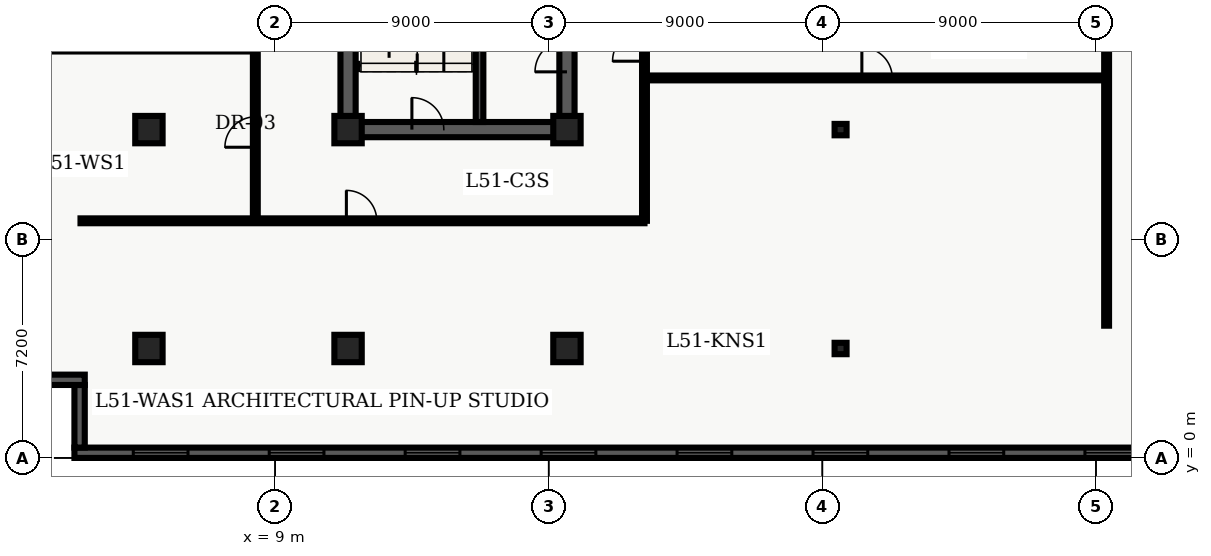
"""IFC4 building model, lengths in metres.
Left out: names, types, materials, properties, quantities, classifications, styles, units other than length and angle.
Written with IfcOpenShell. Run it as: python <this file> out.ifc"""

import sys

from ifc_helpers import new_model, entity, si_unit, converted_unit, direction, frame, origin_with_axes, origin_2d_with_axis, place, context, subcontext, project, spatial, polyline, rectangle, i_section, outline, extrude, element, fill, save


model = new_model("IFC4")
c1 = context("Model", 3, precision=1e-05, world=origin_with_axes(), true_north=direction((0.0, 1.0)))
c2 = subcontext(c1, "Body", "Model", "MODEL_VIEW")
j1 = project(units=[si_unit("LENGTHUNIT", "METRE"), converted_unit("PLANEANGLEUNIT", "DEGREE", entity("IfcPlaneAngleMeasure", 0.017), si_unit("PLANEANGLEUNIT", "RADIAN"), dimensions=[0, 0, 0, 0, 0, 0, 0])], contexts=[c1])
p1 = place(None, origin_with_axes())
s1 = spatial("IfcSite", under=j1, at=p1, CompositionType="ELEMENT")
p2 = place(p1, origin_with_axes())
s2 = spatial("IfcBuilding", under=s1, at=p2, CompositionType="ELEMENT")
p3 = place(p2, frame((0.0, 0.0, 208.2), z_axis=(0.0, 0.0, 1.0), x_axis=(1.0, 0.0, 0.0)))
s3 = spatial("IfcBuildingStorey", under=s2, at=p3, CompositionType="ELEMENT", Elevation=208.2)
p4 = place(p3, frame((11.4, 10.8, 0.0), z_axis=(0.0, 0.0, 1.0), x_axis=(0.0, 1.0, 0.0)))
e1 = element("IfcWall", 1, at=p4, inside=s3, PredefinedType="SHEAR", context=c2, shape_type="SweptSolid", body=[
    extrude(outline(polyline([(0.0, -0.25), (27.0, -0.25), (27.0, 0.25), (0.0, 0.25), (0.0, -0.25)])), origin_with_axes(), (0.0, 0.0, 1.0), 3.66),
])
p5 = place(p3, frame((11.4, 10.8, 0.0), z_axis=(0.0, 0.0, 1.0), x_axis=(1.0, 0.0, 0.0)))
e2 = element("IfcWall", 2, at=p5, inside=s3, PredefinedType="SHEAR", context=c2, shape_type="SweptSolid", body=[
    extrude(outline(polyline([(0.0, -0.25), (7.2, -0.25), (7.2, 0.25), (0.0, 0.25), (0.0, -0.25)])), origin_with_axes(), (0.0, 0.0, 1.0), 3.66),
])
p6 = place(p5, frame((2.625, 0.0, 0.0), z_axis=(0.0, 0.0, 1.0), x_axis=(1.0, 0.0, 0.0)))
e3 = element("IfcOpeningElement", 3, at=p6, cuts=e2, PredefinedType="OPENING", context=c2, shape_type="SweptSolid", body=[
    extrude(rectangle(XDim=1.05, YDim=0.52, at=origin_2d_with_axis()), origin_with_axes(), (0.0, 0.0, 1.0), 2.15),
])
p7 = place(p3, frame((18.6, 10.8, 0.0), z_axis=(0.0, 0.0, 1.0), x_axis=(0.0, 1.0, 0.0)))
e4 = element("IfcWall", 4, at=p7, inside=s3, PredefinedType="SHEAR", context=c2, shape_type="SweptSolid", body=[
    extrude(outline(polyline([(0.0, -0.25), (13.5, -0.25), (13.5, 0.25), (0.0, 0.25), (0.0, -0.25)])), origin_with_axes(), (0.0, 0.0, 1.0), 3.66),
])
p8 = place(p7, frame((11.125, 0.0, 0.0), z_axis=(0.0, 0.0, 1.0), x_axis=(1.0, 0.0, 0.0)))
e5 = element("IfcOpeningElement", 5, at=p8, cuts=e4, PredefinedType="OPENING", context=c2, shape_type="SweptSolid", body=[
    extrude(rectangle(XDim=1.05, YDim=0.52, at=origin_2d_with_axis()), origin_with_axes(), (0.0, 0.0, 1.0), 2.15),
])
p9 = place(p7, frame((2.425, 0.0, 0.0), z_axis=(0.0, 0.0, 1.0), x_axis=(1.0, 0.0, 0.0)))
e6 = element("IfcOpeningElement", 6, at=p9, cuts=e4, PredefinedType="OPENING", context=c2, shape_type="SweptSolid", body=[
    extrude(rectangle(XDim=1.05, YDim=0.52, at=origin_2d_with_axis()), origin_with_axes(), (0.0, 0.0, 1.0), 2.15),
])
p10 = place(p7, frame((6.725, 0.0, 0.0), z_axis=(0.0, 0.0, 1.0), x_axis=(1.0, 0.0, 0.0)))
e7 = element("IfcOpeningElement", 7, at=p10, cuts=e4, PredefinedType="OPENING", context=c2, shape_type="SweptSolid", body=[
    extrude(rectangle(XDim=1.05, YDim=0.52, at=origin_2d_with_axis()), origin_with_axes(), (0.0, 0.0, 1.0), 2.15),
])
p11 = place(p3, frame((15.725, 11.05, 0.0), z_axis=(0.0, 0.0, 1.0), x_axis=(0.0, 1.0, 0.0)))
e8 = element("IfcWall", 8, at=p11, inside=s3, PredefinedType="SHEAR", context=c2, shape_type="SweptSolid", body=[
    extrude(outline(polyline([(0.0, -0.125), (8.65, -0.125), (8.65, 0.125), (0.0, 0.125), (0.0, -0.125)])), origin_with_axes(), (0.0, 0.0, 1.0), 3.66),
])
for number, where, z_axis, x_axis in (
    (9, (11.4, 3.6, 0.0), (0.0, 0.0, 1.0), (1.0, 0.0, 0.0)),
    (10, (11.4, 10.8, 0.0), (0.0, 0.0, 1.0), (1.0, 0.0, 0.0)),
    (11, (18.6, 3.6, 0.0), (0.0, 0.0, 1.0), (1.0, 0.0, 0.0)),
    (12, (18.6, 10.8, 0.0), (0.0, 0.0, 1.0), (1.0, 0.0, 0.0)),
    (13, (4.85, 3.6, 0.0), (0.0, 0.0, 1.0), (1.0, 0.0, 0.0)),
    (14, (4.85, 10.8, 0.0), (0.0, 0.0, 1.0), (1.0, 0.0, 0.0)),
):
    element("IfcColumn", number, at=place(p3, frame(where, z_axis=z_axis, x_axis=x_axis)), inside=s3, PredefinedType="COLUMN", context=c2, shape_type="SweptSolid", body=[
        extrude(rectangle(XDim=0.9, YDim=0.9, at=origin_2d_with_axis()), origin_with_axes(), (0.0, 0.0, 1.0), 3.9),
    ])
for number, where, z_axis, x_axis in (
    (15, (27.6, 3.6, 0.0), (0.0, 0.0, 1.0), (1.0, 0.0, 0.0)),
    (16, (27.6, 10.8, 0.0), (0.0, 0.0, 1.0), (1.0, 0.0, 0.0)),
):
    element("IfcColumn", number, at=place(p3, frame(where, z_axis=z_axis, x_axis=x_axis)), inside=s3, PredefinedType="COLUMN", context=c2, shape_type="SweptSolid", body=[
        extrude(i_section(OverallWidth=0.394, OverallDepth=0.375, WebThickness=0.017, FlangeThickness=0.028, FilletRadius=0.02, at=origin_2d_with_axis()), origin_with_axes(), (0.0, 0.0, 1.0), 3.9),
    ])
p12 = place(p3, frame((2.6, 7.8, 0.0), z_axis=(0.0, 0.0, 1.0), x_axis=(1.0, 0.0, 0.0)))
e17 = element("IfcWall", 17, at=p12, inside=s3, PredefinedType="PARTITIONING", context=c2, shape_type="SweptSolid", body=[
    extrude(outline(polyline([(0.0, -0.08), (18.55, -0.08), (18.55, 0.08), (0.0, 0.08), (0.0, -0.08)])), origin_with_axes(), (0.0, 0.0, 1.0), 2.7),
])
p13 = place(p12, frame((9.245, 0.0, 0.0), z_axis=(0.0, 0.0, 1.0), x_axis=(1.0, 0.0, 0.0)))
e18 = element("IfcOpeningElement", 18, at=p13, cuts=e17, PredefinedType="OPENING", context=c2, shape_type="SweptSolid", body=[
    extrude(rectangle(XDim=1.0, YDim=0.18, at=origin_2d_with_axis()), origin_with_axes(), (0.0, 0.0, 1.0), 2.15),
])
p14 = place(p3, frame((21.15, 7.8, 0.0), z_axis=(0.0, 0.0, 1.0), x_axis=(0.0, 1.0, 0.0)))
e19 = element("IfcWall", 19, at=p14, inside=s3, PredefinedType="PARTITIONING", context=c2, shape_type="SweptSolid", body=[
    extrude(outline(polyline([(0.0, -0.08), (32.7, -0.08), (32.7, 0.08), (0.0, 0.08), (0.0, -0.08)])), origin_with_axes(), (0.0, 0.0, 1.0), 2.7),
])
p15 = place(p14, frame((15.566, 0.0, 0.0), z_axis=(0.0, 0.0, 1.0), x_axis=(1.0, 0.0, 0.0)))
e20 = element("IfcOpeningElement", 20, at=p15, cuts=e19, PredefinedType="OPENING", context=c2, shape_type="SweptSolid", body=[
    extrude(rectangle(XDim=1.0, YDim=0.18, at=origin_2d_with_axis()), origin_with_axes(), (0.0, 0.0, 1.0), 2.15),
])
p16 = place(p14, frame((19.003, 0.0, 0.0), z_axis=(0.0, 0.0, 1.0), x_axis=(1.0, 0.0, 0.0)))
e21 = element("IfcOpeningElement", 21, at=p16, cuts=e19, PredefinedType="OPENING", context=c2, shape_type="SweptSolid", body=[
    extrude(rectangle(XDim=1.0, YDim=0.18, at=origin_2d_with_axis()), origin_with_axes(), (0.0, 0.0, 1.0), 2.15),
])
p17 = place(p14, frame((22.854, 0.0, 0.0), z_axis=(0.0, 0.0, 1.0), x_axis=(1.0, 0.0, 0.0)))
e22 = element("IfcOpeningElement", 22, at=p17, cuts=e19, PredefinedType="OPENING", context=c2, shape_type="SweptSolid", body=[
    extrude(rectangle(XDim=1.0, YDim=0.18, at=origin_2d_with_axis()), origin_with_axes(), (0.0, 0.0, 1.0), 2.15),
])
p18 = place(p14, frame((27.208, 0.0, 0.0), z_axis=(0.0, 0.0, 1.0), x_axis=(1.0, 0.0, 0.0)))
e23 = element("IfcOpeningElement", 23, at=p18, cuts=e19, PredefinedType="OPENING", context=c2, shape_type="SweptSolid", body=[
    extrude(rectangle(XDim=1.0, YDim=0.18, at=origin_2d_with_axis()), origin_with_axes(), (0.0, 0.0, 1.0), 2.15),
])
p19 = place(p14, frame((31.041, 0.0, 0.0), z_axis=(0.0, 0.0, 1.0), x_axis=(1.0, 0.0, 0.0)))
e24 = element("IfcOpeningElement", 24, at=p19, cuts=e19, PredefinedType="OPENING", context=c2, shape_type="SweptSolid", body=[
    extrude(rectangle(XDim=1.0, YDim=0.18, at=origin_2d_with_axis()), origin_with_axes(), (0.0, 0.0, 1.0), 2.15),
])
p20 = place(p14, frame((5.775, 0.0, 0.0), z_axis=(0.0, 0.0, 1.0), x_axis=(1.0, 0.0, 0.0)))
e25 = element("IfcOpeningElement", 25, at=p20, cuts=e19, PredefinedType="OPENING", context=c2, shape_type="SweptSolid", body=[
    extrude(rectangle(XDim=1.05, YDim=0.18, at=origin_2d_with_axis()), origin_with_axes(), (0.0, 0.0, 1.0), 2.15),
])
p21 = place(p3, frame((8.35, 7.8, 0.0), z_axis=(0.0, 0.0, 1.0), x_axis=(0.0, 1.0, 0.0)))
e26 = element("IfcWall", 26, at=p21, inside=s3, PredefinedType="PARTITIONING", context=c2, shape_type="SweptSolid", body=[
    extrude(outline(polyline([(0.0, -0.08), (12.6, -0.08), (12.6, 0.08), (0.0, 0.08), (0.0, -0.08)])), origin_with_axes(), (0.0, 0.0, 1.0), 2.7),
])
p22 = place(p21, frame((2.92, 0.0, 0.0), z_axis=(0.0, 0.0, 1.0), x_axis=(1.0, 0.0, 0.0)))
e27 = element("IfcOpeningElement", 27, at=p22, cuts=e26, PredefinedType="OPENING", context=c2, shape_type="SweptSolid", body=[
    extrude(rectangle(XDim=1.0, YDim=0.18, at=origin_2d_with_axis()), origin_with_axes(), (0.0, 0.0, 1.0), 2.15),
])
p23 = place(p21, frame((9.115, 0.0, 0.0), z_axis=(0.0, 0.0, 1.0), x_axis=(1.0, 0.0, 0.0)))
e28 = element("IfcOpeningElement", 28, at=p23, cuts=e26, PredefinedType="OPENING", context=c2, shape_type="SweptSolid", body=[
    extrude(rectangle(XDim=1.0, YDim=0.18, at=origin_2d_with_axis()), origin_with_axes(), (0.0, 0.0, 1.0), 2.15),
])
p24 = place(p3, frame((21.15, 12.5, 0.0), z_axis=(0.0, 0.0, 1.0), x_axis=(1.0, 0.0, 0.0)))
e29 = element("IfcWall", 29, at=p24, inside=s3, PredefinedType="PARTITIONING", context=c2, shape_type="SweptSolid", body=[
    extrude(outline(polyline([(0.0, -0.08), (15.2, -0.08), (15.2, 0.08), (0.0, 0.08), (0.0, -0.08)])), origin_with_axes(), (0.0, 0.0, 1.0), 2.7),
])
p25 = place(p24, frame((7.65, 0.0, 0.0), z_axis=(0.0, 0.0, 1.0), x_axis=(1.0, 0.0, 0.0)))
e30 = element("IfcOpeningElement", 30, at=p25, cuts=e29, PredefinedType="OPENING", context=c2, shape_type="SweptSolid", body=[
    extrude(rectangle(XDim=1.0, YDim=0.18, at=origin_2d_with_axis()), origin_with_axes(), (0.0, 0.0, 1.0), 2.15),
])
p26 = place(p3, frame((36.35, 4.35, 0.0), z_axis=(0.0, 0.0, 1.0), x_axis=(0.0, 1.0, 0.0)))
e31 = element("IfcWall", 31, at=p26, inside=s3, PredefinedType="PARTITIONING", context=c2, shape_type="SweptSolid", body=[
    extrude(outline(polyline([(0.0, -0.08), (16.95, -0.08), (16.95, 0.08), (0.0, 0.08), (0.0, -0.08)])), origin_with_axes(), (0.0, 0.0, 1.0), 2.7),
])
p27 = place(p3, frame((57.26, 0.17, 0.0), z_axis=(0.0, 0.0, 1.0), x_axis=(-1.0, 0.0, 0.0)))
e32 = element("IfcWall", 32, at=p27, inside=s3, PredefinedType="SOLIDWALL", context=c2, shape_type="SweptSolid", body=[
    extrude(outline(polyline([(0.0, -0.17), (54.86, -0.17), (54.86, 0.17), (0.0, 0.17), (0.0, -0.17)])), origin_with_axes(), (0.0, 0.0, 1.0), 3.66),
])
p28 = place(p27, frame((2.836, 0.0, 0.45), z_axis=(0.0, 0.0, 1.0), x_axis=(1.0, 0.0, 0.0)))
e33 = element("IfcOpeningElement", 33, at=p28, cuts=e32, PredefinedType="OPENING", context=c2, shape_type="SweptSolid", body=[
    extrude(rectangle(XDim=1.8, YDim=0.36, at=origin_2d_with_axis()), origin_with_axes(), (0.0, 0.0, 1.0), 2.1),
])
p29 = place(p27, frame((7.307, 0.0, 0.45), z_axis=(0.0, 0.0, 1.0), x_axis=(1.0, 0.0, 0.0)))
e34 = element("IfcOpeningElement", 34, at=p29, cuts=e32, PredefinedType="OPENING", context=c2, shape_type="SweptSolid", body=[
    extrude(rectangle(XDim=1.8, YDim=0.36, at=origin_2d_with_axis()), origin_with_axes(), (0.0, 0.0, 1.0), 2.1),
])
p30 = place(p27, frame((11.779, 0.0, 0.45), z_axis=(0.0, 0.0, 1.0), x_axis=(1.0, 0.0, 0.0)))
e35 = element("IfcOpeningElement", 35, at=p30, cuts=e32, PredefinedType="OPENING", context=c2, shape_type="SweptSolid", body=[
    extrude(rectangle(XDim=1.8, YDim=0.36, at=origin_2d_with_axis()), origin_with_axes(), (0.0, 0.0, 1.0), 2.1),
])
p31 = place(p27, frame((16.251, 0.0, 0.45), z_axis=(0.0, 0.0, 1.0), x_axis=(1.0, 0.0, 0.0)))
e36 = element("IfcOpeningElement", 36, at=p31, cuts=e32, PredefinedType="OPENING", context=c2, shape_type="SweptSolid", body=[
    extrude(rectangle(XDim=1.8, YDim=0.36, at=origin_2d_with_axis()), origin_with_axes(), (0.0, 0.0, 1.0), 2.1),
])
p32 = place(p27, frame((20.723, 0.0, 0.45), z_axis=(0.0, 0.0, 1.0), x_axis=(1.0, 0.0, 0.0)))
e37 = element("IfcOpeningElement", 37, at=p32, cuts=e32, PredefinedType="OPENING", context=c2, shape_type="SweptSolid", body=[
    extrude(rectangle(XDim=1.8, YDim=0.36, at=origin_2d_with_axis()), origin_with_axes(), (0.0, 0.0, 1.0), 2.1),
])
p33 = place(p27, frame((25.194, 0.0, 0.45), z_axis=(0.0, 0.0, 1.0), x_axis=(1.0, 0.0, 0.0)))
e38 = element("IfcOpeningElement", 38, at=p33, cuts=e32, PredefinedType="OPENING", context=c2, shape_type="SweptSolid", body=[
    extrude(rectangle(XDim=1.8, YDim=0.36, at=origin_2d_with_axis()), origin_with_axes(), (0.0, 0.0, 1.0), 2.1),
])
p34 = place(p27, frame((29.666, 0.0, 0.45), z_axis=(0.0, 0.0, 1.0), x_axis=(1.0, 0.0, 0.0)))
e39 = element("IfcOpeningElement", 39, at=p34, cuts=e32, PredefinedType="OPENING", context=c2, shape_type="SweptSolid", body=[
    extrude(rectangle(XDim=1.8, YDim=0.36, at=origin_2d_with_axis()), origin_with_axes(), (0.0, 0.0, 1.0), 2.1),
])
p35 = place(p27, frame((34.138, 0.0, 0.45), z_axis=(0.0, 0.0, 1.0), x_axis=(1.0, 0.0, 0.0)))
e40 = element("IfcOpeningElement", 40, at=p35, cuts=e32, PredefinedType="OPENING", context=c2, shape_type="SweptSolid", body=[
    extrude(rectangle(XDim=1.8, YDim=0.36, at=origin_2d_with_axis()), origin_with_axes(), (0.0, 0.0, 1.0), 2.1),
])
p36 = place(p27, frame((38.609, 0.0, 0.45), z_axis=(0.0, 0.0, 1.0), x_axis=(1.0, 0.0, 0.0)))
e41 = element("IfcOpeningElement", 41, at=p36, cuts=e32, PredefinedType="OPENING", context=c2, shape_type="SweptSolid", body=[
    extrude(rectangle(XDim=1.8, YDim=0.36, at=origin_2d_with_axis()), origin_with_axes(), (0.0, 0.0, 1.0), 2.1),
])
p37 = place(p27, frame((43.081, 0.0, 0.45), z_axis=(0.0, 0.0, 1.0), x_axis=(1.0, 0.0, 0.0)))
e42 = element("IfcOpeningElement", 42, at=p37, cuts=e32, PredefinedType="OPENING", context=c2, shape_type="SweptSolid", body=[
    extrude(rectangle(XDim=1.8, YDim=0.36, at=origin_2d_with_axis()), origin_with_axes(), (0.0, 0.0, 1.0), 2.1),
])
p38 = place(p27, frame((47.553, 0.0, 0.45), z_axis=(0.0, 0.0, 1.0), x_axis=(1.0, 0.0, 0.0)))
e43 = element("IfcOpeningElement", 43, at=p38, cuts=e32, PredefinedType="OPENING", context=c2, shape_type="SweptSolid", body=[
    extrude(rectangle(XDim=1.8, YDim=0.36, at=origin_2d_with_axis()), origin_with_axes(), (0.0, 0.0, 1.0), 2.1),
])
p39 = place(p27, frame((52.024, 0.0, 0.45), z_axis=(0.0, 0.0, 1.0), x_axis=(1.0, 0.0, 0.0)))
e44 = element("IfcOpeningElement", 44, at=p39, cuts=e32, PredefinedType="OPENING", context=c2, shape_type="SweptSolid", body=[
    extrude(rectangle(XDim=1.8, YDim=0.36, at=origin_2d_with_axis()), origin_with_axes(), (0.0, 0.0, 1.0), 2.1),
])
p40 = place(p3, frame((2.57, 0.34, 0.0), z_axis=(0.0, 0.0, 1.0), x_axis=(0.0, 1.0, 0.0)))
e45 = element("IfcWall", 45, at=p40, inside=s3, PredefinedType="SOLIDWALL", context=c2, shape_type="SweptSolid", body=[
    extrude(outline(polyline([(0.0, -0.17), (2.06, -0.17), (2.06, 0.17), (0.0, 0.17), (0.0, -0.17)])), origin_with_axes(), (0.0, 0.0, 1.0), 3.66),
])
p41 = place(p3, frame((2.74, 2.57, 0.0), z_axis=(0.0, 0.0, 1.0), x_axis=(-1.0, 0.0, 0.0)))
e46 = element("IfcWall", 46, at=p41, inside=s3, PredefinedType="SOLIDWALL", context=c2, shape_type="SweptSolid", body=[
    extrude(outline(polyline([(0.0, -0.17), (2.74, -0.17), (2.74, 0.17), (0.0, 0.17), (0.0, -0.17)])), origin_with_axes(), (0.0, 0.0, 1.0), 3.66),
])
p42 = place(p5, frame((2.625, 0.0, 0.0), z_axis=(0.0, 0.0, 1.0), x_axis=(1.0, 0.0, 0.0)))
e47 = element("IfcDoor", 47, at=p42, inside=s3, OperationType="SINGLE_SWING_LEFT", PredefinedType="DOOR", context=c2, shape_type="SweptSolid", body=[
    extrude(rectangle(XDim=1.05, YDim=0.09, at=origin_2d_with_axis()), origin_with_axes(), (0.0, 0.0, 1.0), 2.15),
])
fill(e3, e47)
p43 = place(p7, frame((2.425, 0.0, 0.0), z_axis=(0.0, 0.0, 1.0), x_axis=(1.0, 0.0, 0.0)))
e48 = element("IfcDoor", 48, at=p43, inside=s3, OperationType="SINGLE_SWING_LEFT", PredefinedType="DOOR", context=c2, shape_type="SweptSolid", body=[
    extrude(rectangle(XDim=1.05, YDim=0.09, at=origin_2d_with_axis()), origin_with_axes(), (0.0, 0.0, 1.0), 2.15),
])
fill(e6, e48)
p44 = place(p21, frame((2.92, 0.0, 0.0), z_axis=(0.0, 0.0, 1.0), x_axis=(1.0, 0.0, 0.0)))
e49 = element("IfcDoor", 49, at=p44, inside=s3, OperationType="SINGLE_SWING_LEFT", PredefinedType="DOOR", context=c2, shape_type="SweptSolid", body=[
    extrude(rectangle(XDim=1.0, YDim=0.09, at=origin_2d_with_axis()), origin_with_axes(), (0.0, 0.0, 1.0), 2.15),
])
fill(e27, e49)
p45 = place(p12, frame((9.245, 0.0, 0.0), z_axis=(0.0, 0.0, 1.0), x_axis=(1.0, 0.0, 0.0)))
e50 = element("IfcDoor", 50, at=p45, inside=s3, OperationType="SINGLE_SWING_LEFT", PredefinedType="DOOR", context=c2, shape_type="SweptSolid", body=[
    extrude(rectangle(XDim=1.0, YDim=0.09, at=origin_2d_with_axis()), origin_with_axes(), (0.0, 0.0, 1.0), 2.15),
])
fill(e18, e50)
p46 = place(p14, frame((5.775, 0.0, 0.0), z_axis=(0.0, 0.0, 1.0), x_axis=(1.0, 0.0, 0.0)))
e51 = element("IfcDoor", 51, at=p46, inside=s3, OperationType="SINGLE_SWING_LEFT", PredefinedType="DOOR", context=c2, shape_type="SweptSolid", body=[
    extrude(rectangle(XDim=1.05, YDim=0.09, at=origin_2d_with_axis()), origin_with_axes(), (0.0, 0.0, 1.0), 2.15),
])
fill(e25, e51)
p47 = place(p24, frame((7.65, 0.0, 0.0), z_axis=(0.0, 0.0, 1.0), x_axis=(1.0, 0.0, 0.0)))
e52 = element("IfcDoor", 52, at=p47, inside=s3, OperationType="SINGLE_SWING_LEFT", PredefinedType="DOOR", context=c2, shape_type="SweptSolid", body=[
    extrude(rectangle(XDim=1.0, YDim=0.09, at=origin_2d_with_axis()), origin_with_axes(), (0.0, 0.0, 1.0), 2.15),
])
fill(e30, e52)
p48 = place(p27, frame((20.723, 0.0, 0.45), z_axis=(0.0, 0.0, 1.0), x_axis=(1.0, 0.0, 0.0)))
e53 = element("IfcWindow", 53, at=p48, inside=s3, PredefinedType="WINDOW", context=c2, shape_type="SweptSolid", body=[
    extrude(rectangle(XDim=1.8, YDim=0.09, at=origin_2d_with_axis()), origin_with_axes(), (0.0, 0.0, 1.0), 2.1),
])
fill(e37, e53)
p49 = place(p27, frame((25.194, 0.0, 0.45), z_axis=(0.0, 0.0, 1.0), x_axis=(1.0, 0.0, 0.0)))
e54 = element("IfcWindow", 54, at=p49, inside=s3, PredefinedType="WINDOW", context=c2, shape_type="SweptSolid", body=[
    extrude(rectangle(XDim=1.8, YDim=0.09, at=origin_2d_with_axis()), origin_with_axes(), (0.0, 0.0, 1.0), 2.1),
])
fill(e38, e54)
p50 = place(p27, frame((29.666, 0.0, 0.45), z_axis=(0.0, 0.0, 1.0), x_axis=(1.0, 0.0, 0.0)))
e55 = element("IfcWindow", 55, at=p50, inside=s3, PredefinedType="WINDOW", context=c2, shape_type="SweptSolid", body=[
    extrude(rectangle(XDim=1.8, YDim=0.09, at=origin_2d_with_axis()), origin_with_axes(), (0.0, 0.0, 1.0), 2.1),
])
fill(e39, e55)
p51 = place(p27, frame((34.138, 0.0, 0.45), z_axis=(0.0, 0.0, 1.0), x_axis=(1.0, 0.0, 0.0)))
e56 = element("IfcWindow", 56, at=p51, inside=s3, PredefinedType="WINDOW", context=c2, shape_type="SweptSolid", body=[
    extrude(rectangle(XDim=1.8, YDim=0.09, at=origin_2d_with_axis()), origin_with_axes(), (0.0, 0.0, 1.0), 2.1),
])
fill(e40, e56)
p52 = place(p27, frame((38.609, 0.0, 0.45), z_axis=(0.0, 0.0, 1.0), x_axis=(1.0, 0.0, 0.0)))
e57 = element("IfcWindow", 57, at=p52, inside=s3, PredefinedType="WINDOW", context=c2, shape_type="SweptSolid", body=[
    extrude(rectangle(XDim=1.8, YDim=0.09, at=origin_2d_with_axis()), origin_with_axes(), (0.0, 0.0, 1.0), 2.1),
])
fill(e41, e57)
p53 = place(p27, frame((43.081, 0.0, 0.45), z_axis=(0.0, 0.0, 1.0), x_axis=(1.0, 0.0, 0.0)))
e58 = element("IfcWindow", 58, at=p53, inside=s3, PredefinedType="WINDOW", context=c2, shape_type="SweptSolid", body=[
    extrude(rectangle(XDim=1.8, YDim=0.09, at=origin_2d_with_axis()), origin_with_axes(), (0.0, 0.0, 1.0), 2.1),
])
fill(e42, e58)
p54 = place(p27, frame((47.553, 0.0, 0.45), z_axis=(0.0, 0.0, 1.0), x_axis=(1.0, 0.0, 0.0)))
e59 = element("IfcWindow", 59, at=p54, inside=s3, PredefinedType="WINDOW", context=c2, shape_type="SweptSolid", body=[
    extrude(rectangle(XDim=1.8, YDim=0.09, at=origin_2d_with_axis()), origin_with_axes(), (0.0, 0.0, 1.0), 2.1),
])
fill(e43, e59)
p55 = place(p27, frame((52.024, 0.0, 0.45), z_axis=(0.0, 0.0, 1.0), x_axis=(1.0, 0.0, 0.0)))
e60 = element("IfcWindow", 60, at=p55, inside=s3, PredefinedType="WINDOW", context=c2, shape_type="SweptSolid", body=[
    extrude(rectangle(XDim=1.8, YDim=0.09, at=origin_2d_with_axis()), origin_with_axes(), (0.0, 0.0, 1.0), 2.1),
])
fill(e44, e60)
save(model, sys.argv[1])
